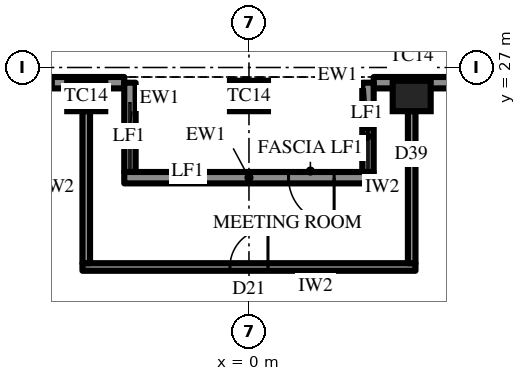
"""IFC4 building model, lengths in metres.
Left out: names, types, materials, properties, quantities, classifications, styles, units other than length and angle.
Written with IfcOpenShell. Run it as: python <this file> out.ifc"""

import sys

from ifc_helpers import new_model, si_unit, direction, frame, frame_2d, origin, origin_2d, place, context, subcontext, project, spatial, rectangle, extrude, element, fill, save


model = new_model("IFC4")
c1 = context("Model", 3, precision=1e-05, world=origin(), true_north=direction((0.0, 1.0)))
c2 = subcontext(c1, "Body", "Model", "MODEL_VIEW")
j1 = project(units=[si_unit("LENGTHUNIT", "METRE"), si_unit("PLANEANGLEUNIT", "RADIAN")], contexts=[c1])
p1 = place(None, origin())
s1 = spatial("IfcSite", under=j1, at=p1, CompositionType="ELEMENT")
p2 = place(p1, origin())
s2 = spatial("IfcBuilding", under=s1, at=p2, CompositionType="ELEMENT")
p3 = place(p2, frame((0.0, 0.0, 345.1)))
s3 = spatial("IfcBuildingStorey", under=s2, at=p3, CompositionType="ELEMENT", Elevation=345.1)
for number, where, z_axis, x_axis in (
    (1, (4.282, 26.25, 0.0), (0.0, 0.0, 1.0), (-1.0, 0.0, 0.0)),
    (2, (0.0, 26.25, 0.0), (0.0, 0.0, 1.0), (-1.0, 0.0, 0.0)),
    (3, (-4.282, 26.25, 0.0), (0.0, 0.0, 1.0), (-1.0, 0.0, 0.0)),
):
    element("IfcColumn", number, at=place(p3, frame(where, z_axis=z_axis, x_axis=x_axis)), inside=s3, PredefinedType="COLUMN", context=c2, shape_type="SweptSolid", body=[
        extrude(rectangle(XDim=1.0, YDim=0.8, at=origin_2d()), origin(), (0.0, 0.0, 1.0), 4.2),
    ])
p4 = place(p3, frame((12.846, 26.6, 0.0), z_axis=(0.0, 0.0, 1.0), x_axis=(-1.0, 0.0, 0.0)))
e4 = element("IfcWall", 4, at=p4, inside=s3, PredefinedType="SOLIDWALL", context=c2, shape_type="SweptSolid", body=[
    extrude(rectangle(XDim=9.564, YDim=0.3, at=frame_2d((4.782, 0.0))), origin(), (0.0, 0.0, 1.0), 2.9),
])
p5 = place(p4, frame((0.866, 0.0, 0.6)))
e5 = element("IfcOpeningElement", 5, at=p5, cuts=e4, PredefinedType="OPENING", context=c2, shape_type="SweptSolid", body=[
    extrude(rectangle(XDim=2.55, YDim=2.05, at=frame_2d((1.275, 1.025))), frame((0.0, 0.16, 0.0), z_axis=(0.0, -1.0, 0.0), x_axis=(1.0, 0.0, 0.0)), (0.0, 0.0, 1.0), 0.32),
])
p6 = place(p4, frame((5.823, 0.0, 0.0)))
e6 = element("IfcOpeningElement", 6, at=p6, cuts=e4, PredefinedType="OPENING", context=c2, shape_type="SweptSolid", body=[
    extrude(rectangle(XDim=1.2, YDim=2.4, at=frame_2d((0.6, 1.2))), frame((0.0, 0.16, 0.0), z_axis=(0.0, -1.0, 0.0), x_axis=(1.0, 0.0, 0.0)), (0.0, 0.0, 1.0), 0.32),
])
p7 = place(p3, frame((-3.282, 26.6, 0.0), z_axis=(0.0, 0.0, 1.0), x_axis=(-1.0, 0.0, 0.0)))
e7 = element("IfcWall", 7, at=p7, inside=s3, PredefinedType="SOLIDWALL", context=c2, shape_type="SweptSolid", body=[
    extrude(rectangle(XDim=9.564, YDim=0.3, at=frame_2d((4.782, 0.0))), origin(), (0.0, 0.0, 1.0), 2.9),
])
p8 = place(p7, frame((1.866, 0.0, 0.6)))
e8 = element("IfcOpeningElement", 8, at=p8, cuts=e7, PredefinedType="OPENING", context=c2, shape_type="SweptSolid", body=[
    extrude(rectangle(XDim=2.55, YDim=2.05, at=frame_2d((1.275, 1.025))), frame((0.0, 0.16, 0.0), z_axis=(0.0, -1.0, 0.0), x_axis=(1.0, 0.0, 0.0)), (0.0, 0.0, 1.0), 0.32),
])
p9 = place(p7, frame((6.148, 0.0, 0.6)))
e9 = element("IfcOpeningElement", 9, at=p9, cuts=e7, PredefinedType="OPENING", context=c2, shape_type="SweptSolid", body=[
    extrude(rectangle(XDim=2.55, YDim=2.05, at=frame_2d((1.275, 1.025))), frame((0.0, 0.16, 0.0), z_axis=(0.0, -1.0, 0.0), x_axis=(1.0, 0.0, 0.0)), (0.0, 0.0, 1.0), 0.32),
])
for number, where, z_axis, x_axis in (
    (10, (3.132, 26.6, 0.0), (0.0, 0.0, 1.0), (0.0, -1.0, 0.0)),
    (11, (-3.132, 26.6, 0.0), (0.0, 0.0, 1.0), (0.0, -1.0, 0.0)),
):
    element("IfcWall", number, at=place(p3, frame(where, z_axis=z_axis, x_axis=x_axis)), inside=s3, PredefinedType="SOLIDWALL", context=c2, shape_type="SweptSolid", body=[
        extrude(rectangle(XDim=2.35, YDim=0.3, at=frame_2d((1.175, 0.0))), origin(), (0.0, 0.0, 1.0), 2.9),
    ])
p10 = place(p3, frame((3.282, 24.1, 0.0), z_axis=(0.0, 0.0, 1.0), x_axis=(-1.0, 0.0, 0.0)))
e12 = element("IfcWall", 12, at=p10, inside=s3, PredefinedType="SOLIDWALL", context=c2, shape_type="SweptSolid", body=[
    extrude(rectangle(XDim=6.564, YDim=0.3, at=frame_2d((3.282, 0.0))), origin(), (0.0, 0.0, 1.0), 2.9),
])
p11 = place(p10, frame((1.041, 0.0, 0.0)))
e13 = element("IfcOpeningElement", 13, at=p11, cuts=e12, PredefinedType="OPENING", context=c2, shape_type="SweptSolid", body=[
    extrude(rectangle(XDim=1.2, YDim=2.4, at=frame_2d((0.6, 1.2))), frame((0.0, 0.16, 0.0), z_axis=(0.0, -1.0, 0.0), x_axis=(1.0, 0.0, 0.0)), (0.0, 0.0, 1.0), 0.32),
])
p12 = place(p3, frame((4.382, 21.75, 0.0), z_axis=(0.0, 0.0, 1.0), x_axis=(-1.0, 0.0, 0.0)))
e14 = element("IfcWall", 14, at=p12, inside=s3, PredefinedType="PARTITIONING", context=c2, shape_type="SweptSolid", body=[
    extrude(rectangle(XDim=8.764, YDim=0.2, at=frame_2d((4.382, 0.0))), origin(), (0.0, 0.0, 1.0), 4.0),
])
p13 = place(p12, frame((3.882, 0.0, 0.0)))
e15 = element("IfcOpeningElement", 15, at=p13, cuts=e14, PredefinedType="OPENING", context=c2, shape_type="SweptSolid", body=[
    extrude(rectangle(XDim=1.0, YDim=2.2, at=frame_2d((0.5, 1.1))), frame((0.0, 0.11, 0.0), z_axis=(0.0, -1.0, 0.0), x_axis=(1.0, 0.0, 0.0)), (0.0, 0.0, 1.0), 0.22),
])
for number, where, z_axis, x_axis in (
    (16, (4.282, 21.85, 0.0), (0.0, 0.0, 1.0), (0.0, 1.0, 0.0)),
    (17, (-4.282, 21.85, 0.0), (0.0, 0.0, 1.0), (0.0, 1.0, 0.0)),
):
    element("IfcWall", number, at=place(p3, frame(where, z_axis=z_axis, x_axis=x_axis)), inside=s3, PredefinedType="PARTITIONING", context=c2, shape_type="SweptSolid", body=[
        extrude(rectangle(XDim=4.0, YDim=0.2, at=frame_2d((2.0, 0.0))), origin(), (0.0, 0.0, 1.0), 2.992),
    ])
p14 = place(p8, origin())
e18 = element("IfcWindow", 18, at=p14, inside=s3, PartitioningType="SINGLE_PANEL", PredefinedType="WINDOW", context=c2, shape_type="SweptSolid", body=[
    extrude(rectangle(XDim=2.55, YDim=2.05, at=frame_2d((1.275, 1.025))), frame((0.0, 0.03, 0.0), z_axis=(0.0, -1.0, 0.0), x_axis=(1.0, 0.0, 0.0)), (0.0, 0.0, 1.0), 0.06),
])
fill(e8, e18)
p15 = place(p11, origin())
e19 = element("IfcDoor", 19, at=p15, inside=s3, OperationType="SINGLE_SWING_RIGHT", PredefinedType="DOOR", context=c2, shape_type="SweptSolid", body=[
    extrude(rectangle(XDim=1.2, YDim=2.4, at=frame_2d((0.6, 1.2))), frame((0.0, 0.025, 0.0), z_axis=(0.0, -1.0, 0.0), x_axis=(1.0, 0.0, 0.0)), (0.0, 0.0, 1.0), 0.05),
])
fill(e13, e19)
p16 = place(p13, frame((1.0, 0.0, 0.0), z_axis=(0.0, 0.0, 1.0), x_axis=(-1.0, 0.0, 0.0)))
e20 = element("IfcDoor", 20, at=p16, inside=s3, OperationType="SINGLE_SWING_LEFT", PredefinedType="DOOR", context=c2, shape_type="SweptSolid", body=[
    extrude(rectangle(XDim=1.0, YDim=2.2, at=frame_2d((0.5, 1.1))), frame((0.0, 0.025, 0.0), z_axis=(0.0, -1.0, 0.0), x_axis=(1.0, 0.0, 0.0)), (0.0, 0.0, 1.0), 0.05),
])
fill(e15, e20)
save(model, sys.argv[1])
